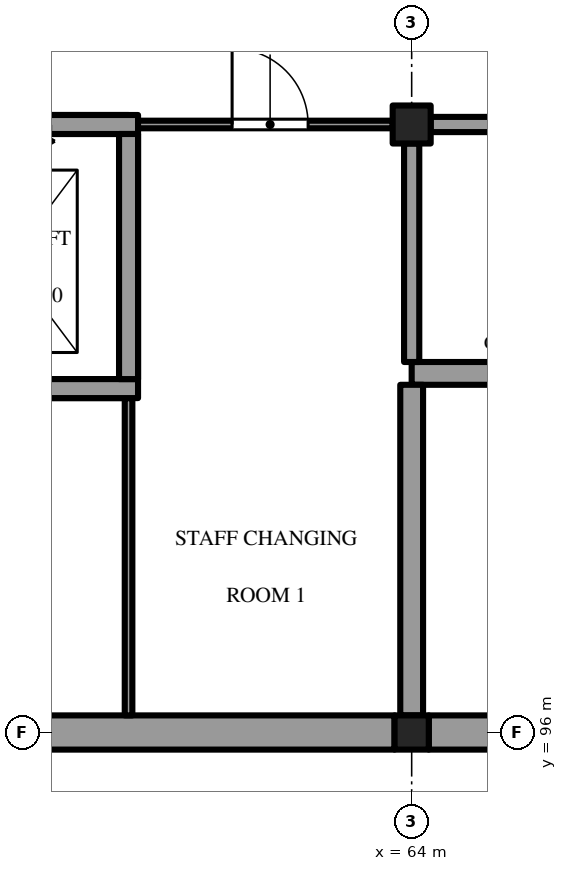
"""IFC4 building model, lengths in metres.
Left out: names, types, materials, properties, quantities, classifications, styles, units other than length and angle.
Written with IfcOpenShell. Run it as: python <this file> out.ifc"""

import sys

from ifc_helpers import new_model, si_unit, direction, frame, frame_2d, origin, origin_2d, place, context, subcontext, project, spatial, rectangle, extrude, element, fill, save


model = new_model("IFC4")
c1 = context("Model", 3, precision=1e-05, world=origin(), true_north=direction((0.0, 1.0)))
c2 = subcontext(c1, "Body", "Model", "MODEL_VIEW")
j1 = project(units=[si_unit("LENGTHUNIT", "METRE"), si_unit("PLANEANGLEUNIT", "RADIAN")], contexts=[c1])
p1 = place(None, origin())
s1 = spatial("IfcSite", under=j1, at=p1, CompositionType="ELEMENT")
p2 = place(p1, origin())
s2 = spatial("IfcBuilding", under=s1, at=p2, CompositionType="ELEMENT")
p3 = place(p2, origin())
s3 = spatial("IfcBuildingStorey", under=s2, at=p3, CompositionType="ELEMENT", Elevation=0.0)
p4 = place(p3, frame((64.0, 96.0, -0.4), z_axis=(0.0, 0.0, 1.0), x_axis=(1.0, 0.0, 0.0)))
e1 = element("IfcColumn", 1, at=p4, inside=s3, PredefinedType="COLUMN", context=c2, shape_type="SweptSolid", body=[
    extrude(rectangle(XDim=0.45, YDim=0.45, at=origin_2d()), origin(), (0.0, 0.0, 1.0), 7.6),
])
p5 = place(p3, frame((64.0, 104.0, -0.4), z_axis=(0.0, 0.0, 1.0), x_axis=(1.0, 0.0, 0.0)))
e2 = element("IfcColumn", 2, at=p5, inside=s3, PredefinedType="COLUMN", context=c2, shape_type="SweptSolid", body=[
    extrude(rectangle(XDim=0.5, YDim=0.5, at=origin_2d()), origin(), (0.0, 0.0, 1.0), 7.6),
])
p6 = place(p3, frame((55.225, 96.0, 0.0), z_axis=(0.0, 0.0, 1.0), x_axis=(1.0, 0.0, 0.0)))
e3 = element("IfcWall", 3, at=p6, inside=s3, PredefinedType="SOLIDWALL", context=c2, shape_type="SweptSolid", body=[
    extrude(rectangle(XDim=8.55, YDim=0.45, at=frame_2d((4.275, 0.0))), origin(), (0.0, 0.0, 1.0), 6.9),
])
p7 = place(p6, frame((0.825, 0.0, 4.4)))
e4 = element("IfcOpeningElement", 4, at=p7, cuts=e3, PredefinedType="OPENING", context=c2, shape_type="SweptSolid", body=[
    extrude(rectangle(XDim=2.4, YDim=1.6, at=frame_2d((1.2, 0.8))), frame((0.0, 0.235, 0.0), z_axis=(0.0, -1.0, 0.0), x_axis=(1.0, 0.0, 0.0)), (0.0, 0.0, 1.0), 0.47),
])
p8 = place(p3, frame((64.225, 96.0, 0.0), z_axis=(0.0, 0.0, 1.0), x_axis=(1.0, 0.0, 0.0)))
e5 = element("IfcWall", 5, at=p8, inside=s3, PredefinedType="SOLIDWALL", context=c2, shape_type="SweptSolid", body=[
    extrude(rectangle(XDim=8.55, YDim=0.45, at=frame_2d((4.275, 0.0))), origin(), (0.0, 0.0, 1.0), 6.9),
])
p9 = place(p8, frame((2.875, 0.0, 0.0)))
e6 = element("IfcOpeningElement", 6, at=p9, cuts=e5, PredefinedType="OPENING", context=c2, shape_type="SweptSolid", body=[
    extrude(rectangle(XDim=1.8, YDim=2.1, at=frame_2d((0.9, 1.05))), frame((0.0, 0.235, 0.0), z_axis=(0.0, -1.0, 0.0), x_axis=(1.0, 0.0, 0.0)), (0.0, 0.0, 1.0), 0.47),
])
p10 = place(p3, frame((57.125, 100.525, 0.0), z_axis=(0.0, 0.0, 1.0), x_axis=(1.0, 0.0, 0.0)))
e7 = element("IfcWall", 7, at=p10, inside=s3, PredefinedType="SOLIDWALL", context=c2, shape_type="SweptSolid", body=[
    extrude(rectangle(XDim=3.15, YDim=0.25, at=frame_2d((1.575, 0.0))), origin(), (0.0, 0.0, 1.0), 6.9),
])
p11 = place(p3, frame((64.0, 100.725, 0.0), z_axis=(0.0, 0.0, 1.0), x_axis=(1.0, 0.0, 0.0)))
e8 = element("IfcWall", 8, at=p11, inside=s3, PredefinedType="SHEAR", context=c2, shape_type="SweptSolid", body=[
    extrude(rectangle(XDim=9.0, YDim=0.3, at=frame_2d((4.5, 0.0))), origin(), (0.0, 0.0, 1.0), 6.9),
])
p12 = place(p11, frame((7.25, 0.0, 0.0)))
e9 = element("IfcOpeningElement", 9, at=p12, cuts=e8, PredefinedType="OPENING", context=c2, shape_type="SweptSolid", body=[
    extrude(rectangle(XDim=1.1, YDim=2.1, at=frame_2d((0.55, 1.05))), frame((0.0, 0.16, 0.0), z_axis=(0.0, -1.0, 0.0), x_axis=(1.0, 0.0, 0.0)), (0.0, 0.0, 1.0), 0.32),
])
p13 = place(p3, frame((57.125, 104.0, 0.0), z_axis=(0.0, 0.0, 1.0), x_axis=(1.0, 0.0, 0.0)))
e10 = element("IfcWall", 10, at=p13, inside=s3, PredefinedType="SOLIDWALL", context=c2, shape_type="SweptSolid", body=[
    extrude(rectangle(XDim=3.15, YDim=0.25, at=frame_2d((1.575, 0.0))), origin(), (0.0, 0.0, 1.0), 6.9),
])
p14 = place(p13, frame((1.025, 0.0, 0.0)))
e11 = element("IfcOpeningElement", 11, at=p14, cuts=e10, PredefinedType="OPENING", context=c2, shape_type="SweptSolid", body=[
    extrude(rectangle(XDim=1.1, YDim=2.1, at=frame_2d((0.55, 1.05))), frame((0.0, 0.135, 0.0), z_axis=(0.0, -1.0, 0.0), x_axis=(1.0, 0.0, 0.0)), (0.0, 0.0, 1.0), 0.27),
])
p15 = place(p3, frame((60.275, 104.0, 0.0), z_axis=(0.0, 0.0, 1.0), x_axis=(1.0, 0.0, 0.0)))
e12 = element("IfcWall", 12, at=p15, inside=s3, PredefinedType="PARTITIONING", context=c2, shape_type="SweptSolid", body=[
    extrude(rectangle(XDim=3.475, YDim=0.1, at=frame_2d((1.738, 0.0))), origin(), (0.0, 0.0, 1.0), 6.9),
])
p16 = place(p15, frame((1.363, 0.0, 0.0)))
e13 = element("IfcOpeningElement", 13, at=p16, cuts=e12, PredefinedType="OPENING", context=c2, shape_type="SweptSolid", body=[
    extrude(rectangle(XDim=1.0, YDim=2.1, at=frame_2d((0.5, 1.05))), frame((0.0, 0.06, 0.0), z_axis=(0.0, -1.0, 0.0), x_axis=(1.0, 0.0, 0.0)), (0.0, 0.0, 1.0), 0.12),
])
p17 = place(p3, frame((64.25, 104.0, 0.0), z_axis=(0.0, 0.0, 1.0), x_axis=(1.0, 0.0, 0.0)))
e14 = element("IfcWall", 14, at=p17, inside=s3, PredefinedType="SOLIDWALL", context=c2, shape_type="SweptSolid", body=[
    extrude(rectangle(XDim=8.525, YDim=0.2, at=frame_2d((4.262, 0.0))), origin(), (0.0, 0.0, 1.0), 6.9),
])
p18 = place(p17, frame((3.7, 0.0, 0.0)))
e15 = element("IfcOpeningElement", 15, at=p18, cuts=e14, PredefinedType="OPENING", context=c2, shape_type="SweptSolid", body=[
    extrude(rectangle(XDim=1.1, YDim=2.1, at=frame_2d((0.55, 1.05))), frame((0.0, 0.11, 0.0), z_axis=(0.0, -1.0, 0.0), x_axis=(1.0, 0.0, 0.0)), (0.0, 0.0, 1.0), 0.22),
])
p19 = place(p3, frame((60.275, 96.225, 0.0), z_axis=(0.0, 0.0, 1.0), x_axis=(0.0, 1.0, 0.0)))
e16 = element("IfcWall", 16, at=p19, inside=s3, PredefinedType="PARTITIONING", context=c2, shape_type="SweptSolid", body=[
    extrude(rectangle(XDim=4.175, YDim=0.1, at=frame_2d((2.087, 0.0))), origin(), (0.0, 0.0, 1.0), 6.9),
])
p20 = place(p3, frame((60.275, 100.65, 0.0), z_axis=(0.0, 0.0, 1.0), x_axis=(0.0, 1.0, 0.0)))
e17 = element("IfcWall", 17, at=p20, inside=s3, PredefinedType="SOLIDWALL", context=c2, shape_type="SweptSolid", body=[
    extrude(rectangle(XDim=3.225, YDim=0.25, at=frame_2d((1.613, 0.0))), origin(), (0.0, 0.0, 1.0), 6.9),
])
p21 = place(p3, frame((64.0, 96.225, 0.0), z_axis=(0.0, 0.0, 1.0), x_axis=(0.0, 1.0, 0.0)))
e18 = element("IfcWall", 18, at=p21, inside=s3, PredefinedType="SHEAR", context=c2, shape_type="SweptSolid", body=[
    extrude(rectangle(XDim=4.35, YDim=0.3, at=frame_2d((2.175, 0.0))), origin(), (0.0, 0.0, 1.0), 6.9),
])
p22 = place(p3, frame((64.0, 100.875, 0.0), z_axis=(0.0, 0.0, 1.0), x_axis=(0.0, 1.0, 0.0)))
e19 = element("IfcWall", 19, at=p22, inside=s3, PredefinedType="SOLIDWALL", context=c2, shape_type="SweptSolid", body=[
    extrude(rectangle(XDim=2.875, YDim=0.2, at=frame_2d((1.438, 0.0))), origin(), (0.0, 0.0, 1.0), 6.9),
])
for number, where, z_axis, x_axis in (
    (20, (57.0, 100.525, -1.4), (0.0, 0.0, 1.0), (1.0, 0.0, 0.0)),
    (21, (57.0, 104.0, -1.4), (0.0, 0.0, 1.0), (1.0, 0.0, 0.0)),
):
    element("IfcWall", number, at=place(p3, frame(where, z_axis=z_axis, x_axis=x_axis)), inside=s3, PredefinedType="SOLIDWALL", context=c2, shape_type="SweptSolid", body=[
        extrude(rectangle(XDim=3.4, YDim=0.25, at=frame_2d((1.7, 0.0))), origin(), (0.0, 0.0, 1.0), 1.1),
    ])
p23 = place(p3, frame((60.275, 100.65, -1.4), z_axis=(0.0, 0.0, 1.0), x_axis=(0.0, 1.0, 0.0)))
e22 = element("IfcWall", 22, at=p23, inside=s3, PredefinedType="SOLIDWALL", context=c2, shape_type="SweptSolid", body=[
    extrude(rectangle(XDim=3.225, YDim=0.25, at=frame_2d((1.613, 0.0))), origin(), (0.0, 0.0, 1.0), 1.1),
])
p24 = place(p16, origin())
e23 = element("IfcDoor", 23, at=p24, inside=s3, OperationType="SINGLE_SWING_LEFT", PredefinedType="DOOR", context=c2, shape_type="SweptSolid", body=[
    extrude(rectangle(XDim=1.0, YDim=2.1, at=frame_2d((0.5, 1.05))), frame((0.0, 0.025, 0.0), z_axis=(0.0, -1.0, 0.0), x_axis=(1.0, 0.0, 0.0)), (0.0, 0.0, 1.0), 0.05),
])
fill(e13, e23)
save(model, sys.argv[1])
